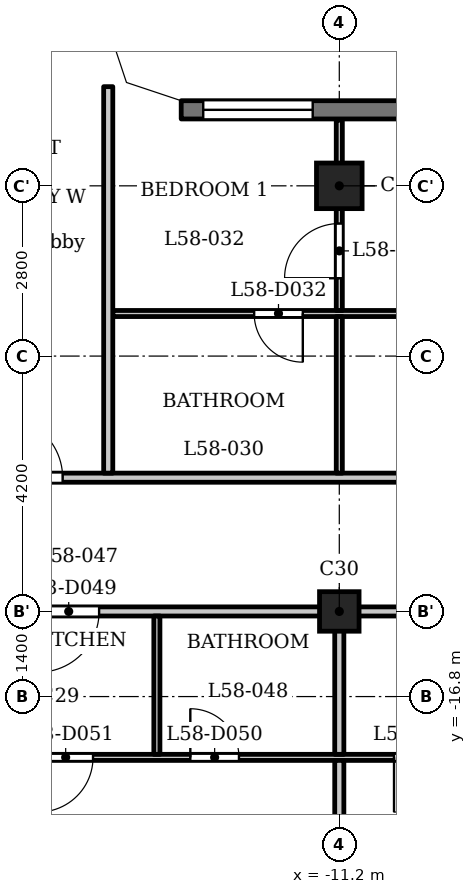
"""IFC4 building model, lengths in metres.
Left out: names, types, materials, properties, quantities, classifications, styles, units other than length and angle.
Written with IfcOpenShell. Run it as: python <this file> out.ifc"""

import sys

from ifc_helpers import new_model, si_unit, direction, frame, frame_2d, origin, origin_2d, place, context, subcontext, project, spatial, polyline, rectangle, outline, extrude, element, fill, save


model = new_model("IFC4")
c1 = context("Model", 3, precision=1e-05, world=origin(), true_north=direction((0.0, 1.0)))
c2 = subcontext(c1, "Body", "Model", "MODEL_VIEW")
j1 = project(units=[si_unit("LENGTHUNIT", "METRE"), si_unit("PLANEANGLEUNIT", "RADIAN")], contexts=[c1])
p1 = place(None, origin())
s1 = spatial("IfcSite", under=j1, at=p1, CompositionType="ELEMENT")
p2 = place(p1, origin())
s2 = spatial("IfcBuilding", under=s1, at=p2, CompositionType="ELEMENT")
p3 = place(p2, frame((0.0, 0.0, 223.9)))
s3 = spatial("IfcBuildingStorey", under=s2, at=p3, CompositionType="ELEMENT", Elevation=223.9)
p4 = place(p3, frame((-11.2, -8.4, 0.0), z_axis=(0.0, 0.0, 1.0), x_axis=(1.0, 0.0, 0.0)))
e1 = element("IfcColumn", 1, at=p4, inside=s3, PredefinedType="COLUMN", context=c2, shape_type="SweptSolid", body=[
    extrude(rectangle(XDim=0.75, YDim=0.75, at=origin_2d()), origin(), (0.0, 0.0, 1.0), 3.5),
])
p5 = place(p3, frame((-11.2, -15.4, 0.0), z_axis=(0.0, 0.0, 1.0), x_axis=(1.0, 0.0, 0.0)))
e2 = element("IfcColumn", 2, at=p5, inside=s3, PredefinedType="COLUMN", context=c2, shape_type="SweptSolid", body=[
    extrude(rectangle(XDim=0.65, YDim=0.65, at=origin_2d()), origin(), (0.0, 0.0, 1.0), 3.5),
])
p6 = place(p3, frame((13.8, -7.15, 0.0), z_axis=(0.0, 0.0, 1.0), x_axis=(-1.0, 0.0, 0.0)))
e3 = element("IfcWall", 3, at=p6, inside=s3, PredefinedType="SOLIDWALL", context=c2, shape_type="SweptSolid", body=[
    extrude(rectangle(XDim=27.6, YDim=0.3, at=frame_2d((13.8, 0.0))), origin(), (0.0, 0.0, 1.0), 3.2),
])
p7 = place(p6, frame((0.363, 0.0, 0.9)))
e4 = element("IfcOpeningElement", 4, at=p7, cuts=e3, PredefinedType="OPENING", context=c2, shape_type="SweptSolid", body=[
    extrude(rectangle(XDim=1.8, YDim=1.25, at=frame_2d((0.9, 0.625))), frame((0.0, 0.16, 0.0), z_axis=(0.0, -1.0, 0.0), x_axis=(1.0, 0.0, 0.0)), (0.0, 0.0, 1.0), 0.32),
])
p8 = place(p6, frame((3.6, 0.0, 1.2)))
e5 = element("IfcOpeningElement", 5, at=p8, cuts=e3, PredefinedType="OPENING", context=c2, shape_type="SweptSolid", body=[
    extrude(rectangle(XDim=3.6, YDim=0.95, at=frame_2d((1.8, 0.475))), frame((0.0, 0.16, 0.0), z_axis=(0.0, -1.0, 0.0), x_axis=(1.0, 0.0, 0.0)), (0.0, 0.0, 1.0), 0.32),
])
p9 = place(p6, frame((9.2, 0.0, 1.2)))
e6 = element("IfcOpeningElement", 6, at=p9, cuts=e3, PredefinedType="OPENING", context=c2, shape_type="SweptSolid", body=[
    extrude(rectangle(XDim=3.6, YDim=0.95, at=frame_2d((1.8, 0.475))), frame((0.0, 0.16, 0.0), z_axis=(0.0, -1.0, 0.0), x_axis=(1.0, 0.0, 0.0)), (0.0, 0.0, 1.0), 0.32),
])
p10 = place(p6, frame((14.8, 0.0, 1.2)))
e7 = element("IfcOpeningElement", 7, at=p10, cuts=e3, PredefinedType="OPENING", context=c2, shape_type="SweptSolid", body=[
    extrude(rectangle(XDim=3.6, YDim=0.95, at=frame_2d((1.8, 0.475))), frame((0.0, 0.16, 0.0), z_axis=(0.0, -1.0, 0.0), x_axis=(1.0, 0.0, 0.0)), (0.0, 0.0, 1.0), 0.32),
])
p11 = place(p6, frame((20.4, 0.0, 1.2)))
e8 = element("IfcOpeningElement", 8, at=p11, cuts=e3, PredefinedType="OPENING", context=c2, shape_type="SweptSolid", body=[
    extrude(rectangle(XDim=3.6, YDim=0.95, at=frame_2d((1.8, 0.475))), frame((0.0, 0.16, 0.0), z_axis=(0.0, -1.0, 0.0), x_axis=(1.0, 0.0, 0.0)), (0.0, 0.0, 1.0), 0.32),
])
p12 = place(p6, frame((25.438, 0.0, 0.9)))
e9 = element("IfcOpeningElement", 9, at=p12, cuts=e3, PredefinedType="OPENING", context=c2, shape_type="SweptSolid", body=[
    extrude(rectangle(XDim=1.8, YDim=1.25, at=frame_2d((0.9, 0.625))), frame((0.0, 0.16, 0.0), z_axis=(0.0, -1.0, 0.0), x_axis=(1.0, 0.0, 0.0)), (0.0, 0.0, 1.0), 0.32),
])
p13 = place(p3, frame((-23.594, -17.8, 0.0), z_axis=(0.0, 0.0, 1.0), x_axis=(1.0, 0.0, 0.0)))
e10 = element("IfcWall", 10, at=p13, inside=s3, PredefinedType="PARTITIONING", context=c2, shape_type="SweptSolid", body=[
    extrude(rectangle(XDim=47.188, YDim=0.1, at=frame_2d((23.594, 0.0))), origin(), (0.0, 0.0, 1.0), 3.2),
])
p14 = place(p13, frame((5.094, 0.0, 0.0)))
e11 = element("IfcOpeningElement", 11, at=p14, cuts=e10, PredefinedType="OPENING", context=c2, shape_type="SweptSolid", body=[
    extrude(rectangle(XDim=0.8, YDim=2.1, at=frame_2d((0.4, 1.05))), frame((0.0, 0.06, 0.0), z_axis=(0.0, -1.0, 0.0), x_axis=(1.0, 0.0, 0.0)), (0.0, 0.0, 1.0), 0.12),
])
p15 = place(p13, frame((1.126, 0.0, 0.0)))
e12 = element("IfcOpeningElement", 12, at=p15, cuts=e10, PredefinedType="OPENING", context=c2, shape_type="SweptSolid", body=[
    extrude(rectangle(XDim=0.9, YDim=2.1, at=frame_2d((0.45, 1.05))), frame((0.0, 0.06, 0.0), z_axis=(0.0, -1.0, 0.0), x_axis=(1.0, 0.0, 0.0)), (0.0, 0.0, 1.0), 0.12),
])
p16 = place(p13, frame((9.944, 0.0, 0.0)))
e13 = element("IfcOpeningElement", 13, at=p16, cuts=e10, PredefinedType="OPENING", context=c2, shape_type="SweptSolid", body=[
    extrude(rectangle(XDim=0.8, YDim=2.1, at=frame_2d((0.4, 1.05))), frame((0.0, 0.06, 0.0), z_axis=(0.0, -1.0, 0.0), x_axis=(1.0, 0.0, 0.0)), (0.0, 0.0, 1.0), 0.12),
])
p17 = place(p13, frame((7.444, 0.0, 0.0)))
e14 = element("IfcOpeningElement", 14, at=p17, cuts=e10, PredefinedType="OPENING", context=c2, shape_type="SweptSolid", body=[
    extrude(rectangle(XDim=0.9, YDim=2.1, at=frame_2d((0.45, 1.05))), frame((0.0, 0.06, 0.0), z_axis=(0.0, -1.0, 0.0), x_axis=(1.0, 0.0, 0.0)), (0.0, 0.0, 1.0), 0.12),
])
p18 = place(p13, frame((16.544, 0.0, 0.0)))
e15 = element("IfcOpeningElement", 15, at=p18, cuts=e10, PredefinedType="OPENING", context=c2, shape_type="SweptSolid", body=[
    extrude(rectangle(XDim=0.8, YDim=2.1, at=frame_2d((0.4, 1.05))), frame((0.0, 0.06, 0.0), z_axis=(0.0, -1.0, 0.0), x_axis=(1.0, 0.0, 0.0)), (0.0, 0.0, 1.0), 0.12),
])
p19 = place(p13, frame((13.294, 0.0, 0.0)))
e16 = element("IfcOpeningElement", 16, at=p19, cuts=e10, PredefinedType="OPENING", context=c2, shape_type="SweptSolid", body=[
    extrude(rectangle(XDim=0.9, YDim=2.1, at=frame_2d((0.45, 1.05))), frame((0.0, 0.06, 0.0), z_axis=(0.0, -1.0, 0.0), x_axis=(1.0, 0.0, 0.0)), (0.0, 0.0, 1.0), 0.12),
])
p20 = place(p13, frame((21.144, 0.0, 0.0)))
e17 = element("IfcOpeningElement", 17, at=p20, cuts=e10, PredefinedType="OPENING", context=c2, shape_type="SweptSolid", body=[
    extrude(rectangle(XDim=0.8, YDim=2.1, at=frame_2d((0.4, 1.05))), frame((0.0, 0.06, 0.0), z_axis=(0.0, -1.0, 0.0), x_axis=(1.0, 0.0, 0.0)), (0.0, 0.0, 1.0), 0.12),
])
p21 = place(p13, frame((18.894, 0.0, 0.0)))
e18 = element("IfcOpeningElement", 18, at=p21, cuts=e10, PredefinedType="OPENING", context=c2, shape_type="SweptSolid", body=[
    extrude(rectangle(XDim=0.9, YDim=2.1, at=frame_2d((0.45, 1.05))), frame((0.0, 0.06, 0.0), z_axis=(0.0, -1.0, 0.0), x_axis=(1.0, 0.0, 0.0)), (0.0, 0.0, 1.0), 0.12),
])
p22 = place(p13, frame((35.944, 0.0, 0.0)))
e19 = element("IfcOpeningElement", 19, at=p22, cuts=e10, PredefinedType="OPENING", context=c2, shape_type="SweptSolid", body=[
    extrude(rectangle(XDim=0.9, YDim=2.1, at=frame_2d((0.45, 1.05))), frame((0.0, 0.06, 0.0), z_axis=(0.0, -1.0, 0.0), x_axis=(1.0, 0.0, 0.0)), (0.0, 0.0, 1.0), 0.12),
])
p23 = place(p13, frame((32.594, 0.0, 0.0)))
e20 = element("IfcOpeningElement", 20, at=p23, cuts=e10, PredefinedType="OPENING", context=c2, shape_type="SweptSolid", body=[
    extrude(rectangle(XDim=0.9, YDim=2.1, at=frame_2d((0.45, 1.05))), frame((0.0, 0.06, 0.0), z_axis=(0.0, -1.0, 0.0), x_axis=(1.0, 0.0, 0.0)), (0.0, 0.0, 1.0), 0.12),
])
p24 = place(p13, frame((40.944, 0.0, 0.0)))
e21 = element("IfcOpeningElement", 21, at=p24, cuts=e10, PredefinedType="OPENING", context=c2, shape_type="SweptSolid", body=[
    extrude(rectangle(XDim=0.8, YDim=2.1, at=frame_2d((0.4, 1.05))), frame((0.0, 0.06, 0.0), z_axis=(0.0, -1.0, 0.0), x_axis=(1.0, 0.0, 0.0)), (0.0, 0.0, 1.0), 0.12),
])
p25 = place(p13, frame((45.444, 0.0, 0.0)))
e22 = element("IfcOpeningElement", 22, at=p25, cuts=e10, PredefinedType="OPENING", context=c2, shape_type="SweptSolid", body=[
    extrude(rectangle(XDim=0.9, YDim=2.1, at=frame_2d((0.45, 1.05))), frame((0.0, 0.06, 0.0), z_axis=(0.0, -1.0, 0.0), x_axis=(1.0, 0.0, 0.0)), (0.0, 0.0, 1.0), 0.12),
])
p26 = place(p3, frame((-24.684, -15.4, 0.0), z_axis=(0.0, 0.0, 1.0), x_axis=(1.0, 0.0, 0.0)))
e23 = element("IfcWall", 23, at=p26, inside=s3, PredefinedType="PARTITIONING", context=c2, shape_type="SweptSolid", body=[
    extrude(rectangle(XDim=49.368, YDim=0.15, at=frame_2d((24.684, 0.0))), origin(), (0.0, 0.0, 1.0), 3.2),
])
p27 = place(p26, frame((1.143, 0.0, 0.0)))
e24 = element("IfcOpeningElement", 24, at=p27, cuts=e23, PredefinedType="OPENING", context=c2, shape_type="SweptSolid", body=[
    extrude(rectangle(XDim=1.0, YDim=2.1, at=frame_2d((0.5, 1.05))), frame((0.0, 0.085, 0.0), z_axis=(0.0, -1.0, 0.0), x_axis=(1.0, 0.0, 0.0)), (0.0, 0.0, 1.0), 0.17),
])
p28 = place(p26, frame((8.534, 0.0, 0.0)))
e25 = element("IfcOpeningElement", 25, at=p28, cuts=e23, PredefinedType="OPENING", context=c2, shape_type="SweptSolid", body=[
    extrude(rectangle(XDim=1.0, YDim=2.1, at=frame_2d((0.5, 1.05))), frame((0.0, 0.085, 0.0), z_axis=(0.0, -1.0, 0.0), x_axis=(1.0, 0.0, 0.0)), (0.0, 0.0, 1.0), 0.17),
])
p29 = place(p26, frame((15.384, 0.0, 0.0)))
e26 = element("IfcOpeningElement", 26, at=p29, cuts=e23, PredefinedType="OPENING", context=c2, shape_type="SweptSolid", body=[
    extrude(rectangle(XDim=1.0, YDim=2.1, at=frame_2d((0.5, 1.05))), frame((0.0, 0.085, 0.0), z_axis=(0.0, -1.0, 0.0), x_axis=(1.0, 0.0, 0.0)), (0.0, 0.0, 1.0), 0.17),
])
p30 = place(p26, frame((19.984, 0.0, 0.0)))
e27 = element("IfcOpeningElement", 27, at=p30, cuts=e23, PredefinedType="OPENING", context=c2, shape_type="SweptSolid", body=[
    extrude(rectangle(XDim=1.0, YDim=2.1, at=frame_2d((0.5, 1.05))), frame((0.0, 0.085, 0.0), z_axis=(0.0, -1.0, 0.0), x_axis=(1.0, 0.0, 0.0)), (0.0, 0.0, 1.0), 0.17),
])
p31 = place(p26, frame((39.784, 0.0, 0.0)))
e28 = element("IfcOpeningElement", 28, at=p31, cuts=e23, PredefinedType="OPENING", context=c2, shape_type="SweptSolid", body=[
    extrude(rectangle(XDim=1.0, YDim=2.1, at=frame_2d((0.5, 1.05))), frame((0.0, 0.085, 0.0), z_axis=(0.0, -1.0, 0.0), x_axis=(1.0, 0.0, 0.0)), (0.0, 0.0, 1.0), 0.17),
])
p32 = place(p26, frame((47.384, 0.0, 0.0)))
e29 = element("IfcOpeningElement", 29, at=p32, cuts=e23, PredefinedType="OPENING", context=c2, shape_type="SweptSolid", body=[
    extrude(rectangle(XDim=1.0, YDim=2.1, at=frame_2d((0.5, 1.05))), frame((0.0, 0.085, 0.0), z_axis=(0.0, -1.0, 0.0), x_axis=(1.0, 0.0, 0.0)), (0.0, 0.0, 1.0), 0.17),
])
p33 = place(p3, frame((-17.4, -13.2, 0.0), z_axis=(0.0, 0.0, 1.0), x_axis=(1.0, 0.0, 0.0)))
e30 = element("IfcWall", 30, at=p33, inside=s3, PredefinedType="PARTITIONING", context=c2, shape_type="SweptSolid", body=[
    extrude(rectangle(XDim=34.8, YDim=0.15, at=frame_2d((17.4, 0.0))), origin(), (0.0, 0.0, 1.0), 3.2),
])
p34 = place(p33, frame((0.65, 0.0, 0.0)))
e31 = element("IfcOpeningElement", 31, at=p34, cuts=e30, PredefinedType="OPENING", context=c2, shape_type="SweptSolid", body=[
    extrude(rectangle(XDim=1.0, YDim=2.1, at=frame_2d((0.5, 1.05))), frame((0.0, 0.085, 0.0), z_axis=(0.0, -1.0, 0.0), x_axis=(1.0, 0.0, 0.0)), (0.0, 0.0, 1.0), 0.17),
])
p35 = place(p33, frame((33.05, 0.0, 0.0)))
e32 = element("IfcOpeningElement", 32, at=p35, cuts=e30, PredefinedType="OPENING", context=c2, shape_type="SweptSolid", body=[
    extrude(rectangle(XDim=1.0, YDim=2.1, at=frame_2d((0.5, 1.05))), frame((0.0, 0.085, 0.0), z_axis=(0.0, -1.0, 0.0), x_axis=(1.0, 0.0, 0.0)), (0.0, 0.0, 1.0), 0.17),
])
p36 = place(p33, frame((10.15, 0.0, 0.0)))
e33 = element("IfcOpeningElement", 33, at=p36, cuts=e30, PredefinedType="OPENING", context=c2, shape_type="SweptSolid", body=[
    extrude(rectangle(XDim=1.0, YDim=2.1, at=frame_2d((0.5, 1.05))), frame((0.0, 0.085, 0.0), z_axis=(0.0, -1.0, 0.0), x_axis=(1.0, 0.0, 0.0)), (0.0, 0.0, 1.0), 0.17),
])
p37 = place(p33, frame((12.5, 0.0, 0.0)))
e34 = element("IfcOpeningElement", 34, at=p37, cuts=e30, PredefinedType="OPENING", context=c2, shape_type="SweptSolid", body=[
    extrude(rectangle(XDim=1.0, YDim=2.1, at=frame_2d((0.5, 1.05))), frame((0.0, 0.085, 0.0), z_axis=(0.0, -1.0, 0.0), x_axis=(1.0, 0.0, 0.0)), (0.0, 0.0, 1.0), 0.17),
])
p38 = place(p33, frame((18.0, 0.0, 0.0)))
e35 = element("IfcOpeningElement", 35, at=p38, cuts=e30, PredefinedType="OPENING", context=c2, shape_type="SweptSolid", body=[
    extrude(rectangle(XDim=1.0, YDim=2.1, at=frame_2d((0.5, 1.05))), frame((0.0, 0.085, 0.0), z_axis=(0.0, -1.0, 0.0), x_axis=(1.0, 0.0, 0.0)), (0.0, 0.0, 1.0), 0.17),
])
p39 = place(p33, frame((30.75, 0.0, 0.0)))
e36 = element("IfcOpeningElement", 36, at=p39, cuts=e30, PredefinedType="OPENING", context=c2, shape_type="SweptSolid", body=[
    extrude(rectangle(XDim=1.0, YDim=2.1, at=frame_2d((0.5, 1.05))), frame((0.0, 0.085, 0.0), z_axis=(0.0, -1.0, 0.0), x_axis=(1.0, 0.0, 0.0)), (0.0, 0.0, 1.0), 0.17),
])
p40 = place(p3, frame((-14.925, -10.5, 0.0), z_axis=(0.0, 0.0, 1.0), x_axis=(1.0, 0.0, 0.0)))
e37 = element("IfcWall", 37, at=p40, inside=s3, PredefinedType="PARTITIONING", context=c2, shape_type="SweptSolid", body=[
    extrude(rectangle(XDim=29.85, YDim=0.1, at=frame_2d((14.925, 0.0))), origin(), (0.0, 0.0, 1.0), 3.2),
])
p41 = place(p40, frame((2.325, 0.0, 0.0)))
e38 = element("IfcOpeningElement", 38, at=p41, cuts=e37, PredefinedType="OPENING", context=c2, shape_type="SweptSolid", body=[
    extrude(rectangle(XDim=0.8, YDim=2.1, at=frame_2d((0.4, 1.05))), frame((0.0, 0.06, 0.0), z_axis=(0.0, -1.0, 0.0), x_axis=(1.0, 0.0, 0.0)), (0.0, 0.0, 1.0), 0.12),
])
p42 = place(p40, frame((7.775, 0.0, 0.0)))
e39 = element("IfcOpeningElement", 39, at=p42, cuts=e37, PredefinedType="OPENING", context=c2, shape_type="SweptSolid", body=[
    extrude(rectangle(XDim=0.9, YDim=2.1, at=frame_2d((0.45, 1.05))), frame((0.0, 0.06, 0.0), z_axis=(0.0, -1.0, 0.0), x_axis=(1.0, 0.0, 0.0)), (0.0, 0.0, 1.0), 0.12),
])
p43 = place(p40, frame((13.575, 0.0, 0.0)))
e40 = element("IfcOpeningElement", 40, at=p43, cuts=e37, PredefinedType="OPENING", context=c2, shape_type="SweptSolid", body=[
    extrude(rectangle(XDim=0.8, YDim=2.1, at=frame_2d((0.4, 1.05))), frame((0.0, 0.06, 0.0), z_axis=(0.0, -1.0, 0.0), x_axis=(1.0, 0.0, 0.0)), (0.0, 0.0, 1.0), 0.12),
])
p44 = place(p40, frame((10.125, 0.0, 0.0)))
e41 = element("IfcOpeningElement", 41, at=p44, cuts=e37, PredefinedType="OPENING", context=c2, shape_type="SweptSolid", body=[
    extrude(rectangle(XDim=0.9, YDim=2.1, at=frame_2d((0.45, 1.05))), frame((0.0, 0.06, 0.0), z_axis=(0.0, -1.0, 0.0), x_axis=(1.0, 0.0, 0.0)), (0.0, 0.0, 1.0), 0.12),
])
p45 = place(p40, frame((18.825, 0.0, 0.0)))
e42 = element("IfcOpeningElement", 42, at=p45, cuts=e37, PredefinedType="OPENING", context=c2, shape_type="SweptSolid", body=[
    extrude(rectangle(XDim=0.8, YDim=2.1, at=frame_2d((0.4, 1.05))), frame((0.0, 0.06, 0.0), z_axis=(0.0, -1.0, 0.0), x_axis=(1.0, 0.0, 0.0)), (0.0, 0.0, 1.0), 0.12),
])
p46 = place(p40, frame((15.625, 0.0, 0.0)))
e43 = element("IfcOpeningElement", 43, at=p46, cuts=e37, PredefinedType="OPENING", context=c2, shape_type="SweptSolid", body=[
    extrude(rectangle(XDim=0.9, YDim=2.1, at=frame_2d((0.45, 1.05))), frame((0.0, 0.06, 0.0), z_axis=(0.0, -1.0, 0.0), x_axis=(1.0, 0.0, 0.0)), (0.0, 0.0, 1.0), 0.12),
])
p47 = place(p40, frame((24.675, 0.0, 0.0)))
e44 = element("IfcOpeningElement", 44, at=p47, cuts=e37, PredefinedType="OPENING", context=c2, shape_type="SweptSolid", body=[
    extrude(rectangle(XDim=0.8, YDim=2.1, at=frame_2d((0.4, 1.05))), frame((0.0, 0.06, 0.0), z_axis=(0.0, -1.0, 0.0), x_axis=(1.0, 0.0, 0.0)), (0.0, 0.0, 1.0), 0.12),
])
p48 = place(p40, frame((28.375, 0.0, 0.0)))
e45 = element("IfcOpeningElement", 45, at=p48, cuts=e37, PredefinedType="OPENING", context=c2, shape_type="SweptSolid", body=[
    extrude(rectangle(XDim=0.9, YDim=2.1, at=frame_2d((0.45, 1.05))), frame((0.0, 0.06, 0.0), z_axis=(0.0, -1.0, 0.0), x_axis=(1.0, 0.0, 0.0)), (0.0, 0.0, 1.0), 0.12),
])
p49 = place(p3, frame((-15.0, -13.125, 0.0), z_axis=(0.0, 0.0, 1.0), x_axis=(0.0, 1.0, 0.0)))
e46 = element("IfcWall", 46, at=p49, inside=s3, PredefinedType="PARTITIONING", context=c2, shape_type="SweptSolid", body=[
    extrude(rectangle(XDim=6.356, YDim=0.15, at=frame_2d((3.178, 0.0))), origin(), (0.0, 0.0, 1.0), 3.2),
])
p50 = place(p3, frame((-14.2, -17.75, 0.0), z_axis=(0.0, 0.0, 1.0), x_axis=(0.0, 1.0, 0.0)))
e47 = element("IfcWall", 47, at=p50, inside=s3, PredefinedType="PARTITIONING", context=c2, shape_type="SweptSolid", body=[
    extrude(rectangle(XDim=2.275, YDim=0.1, at=frame_2d((1.137, 0.0))), origin(), (0.0, 0.0, 1.0), 3.2),
])
p51 = place(p3, frame((-11.2, -13.125, 0.0), z_axis=(0.0, 0.0, 1.0), x_axis=(0.0, 1.0, 0.0)))
e48 = element("IfcWall", 48, at=p51, inside=s3, PredefinedType="PARTITIONING", context=c2, shape_type="SweptSolid", body=[
    extrude(rectangle(XDim=2.575, YDim=0.1, at=frame_2d((1.288, 0.0))), origin(), (0.0, 0.0, 1.0), 3.2),
])
p52 = place(p3, frame((-11.2, -10.45, 0.0), z_axis=(0.0, 0.0, 1.0), x_axis=(0.0, 1.0, 0.0)))
e49 = element("IfcWall", 49, at=p52, inside=s3, PredefinedType="PARTITIONING", context=c2, shape_type="SweptSolid", body=[
    extrude(rectangle(XDim=3.13, YDim=0.1, at=frame_2d((1.565, 0.0))), origin(), (0.0, 0.0, 1.0), 3.2),
])
p53 = place(p52, frame((0.53, 0.0, 0.0)))
e50 = element("IfcOpeningElement", 50, at=p53, cuts=e49, PredefinedType="OPENING", context=c2, shape_type="SweptSolid", body=[
    extrude(rectangle(XDim=0.9, YDim=2.1, at=frame_2d((0.45, 1.05))), frame((0.0, 0.06, 0.0), z_axis=(0.0, -1.0, 0.0), x_axis=(1.0, 0.0, 0.0)), (0.0, 0.0, 1.0), 0.12),
])
p54 = place(p3, frame((-11.2, -22.08, 0.0), z_axis=(0.0, 0.0, 1.0), x_axis=(0.0, 1.0, 0.0)))
e51 = element("IfcWall", 51, at=p54, inside=s3, PredefinedType="PARTITIONING", context=c2, shape_type="SweptSolid", body=[
    extrude(rectangle(XDim=4.23, YDim=0.15, at=frame_2d((2.115, 0.0))), origin(), (0.0, 0.0, 1.0), 3.2),
])
p55 = place(p3, frame((-11.2, -17.75, 0.0), z_axis=(0.0, 0.0, 1.0), x_axis=(0.0, 1.0, 0.0)))
e52 = element("IfcWall", 52, at=p55, inside=s3, PredefinedType="PARTITIONING", context=c2, shape_type="SweptSolid", body=[
    extrude(rectangle(XDim=2.275, YDim=0.15, at=frame_2d((1.137, 0.0))), origin(), (0.0, 0.0, 1.0), 3.2),
])
p56 = place(p3, origin())
e53 = element("IfcWall", 53, at=p56, inside=s3, PredefinedType="SOLIDWALL", context=c2, shape_type="SweptSolid", body=[
    extrude(outline(polyline([(-14.937, -6.937), (-13.849, -7.3), (-13.8, -7.3), (-13.8, -7.0), (-14.7, -6.7), (-15.0, -5.8), (-15.3, -5.8), (-15.3, -5.849), (-14.937, -6.937)])), origin(), (0.0, 0.0, 1.0), 3.2),
])
p57 = place(p34, origin())
e54 = element("IfcDoor", 54, at=p57, inside=s3, OperationType="SINGLE_SWING_RIGHT", PredefinedType="DOOR", context=c2, shape_type="SweptSolid", body=[
    extrude(rectangle(XDim=1.0, YDim=2.1, at=frame_2d((0.5, 1.05))), frame((0.0, 0.025, 0.0), z_axis=(0.0, -1.0, 0.0), x_axis=(1.0, 0.0, 0.0)), (0.0, 0.0, 1.0), 0.05),
])
fill(e31, e54)
p58 = place(p41, origin())
e55 = element("IfcDoor", 55, at=p58, inside=s3, OperationType="SINGLE_SWING_RIGHT", PredefinedType="DOOR", context=c2, shape_type="SweptSolid", body=[
    extrude(rectangle(XDim=0.8, YDim=2.1, at=frame_2d((0.4, 1.05))), frame((0.0, 0.025, 0.0), z_axis=(0.0, -1.0, 0.0), x_axis=(1.0, 0.0, 0.0)), (0.0, 0.0, 1.0), 0.05),
])
fill(e38, e55)
p59 = place(p53, origin())
e56 = element("IfcDoor", 56, at=p59, inside=s3, OperationType="SINGLE_SWING_RIGHT", PredefinedType="DOOR", context=c2, shape_type="SweptSolid", body=[
    extrude(rectangle(XDim=0.9, YDim=2.1, at=frame_2d((0.45, 1.05))), frame((0.0, 0.025, 0.0), z_axis=(0.0, -1.0, 0.0), x_axis=(1.0, 0.0, 0.0)), (0.0, 0.0, 1.0), 0.05),
])
fill(e50, e56)
p60 = place(p28, origin())
e57 = element("IfcDoor", 57, at=p60, inside=s3, OperationType="SINGLE_SWING_LEFT", PredefinedType="DOOR", context=c2, shape_type="SweptSolid", body=[
    extrude(rectangle(XDim=1.0, YDim=2.1, at=frame_2d((0.5, 1.05))), frame((0.0, 0.025, 0.0), z_axis=(0.0, -1.0, 0.0), x_axis=(1.0, 0.0, 0.0)), (0.0, 0.0, 1.0), 0.05),
])
fill(e25, e57)
p61 = place(p16, origin())
e58 = element("IfcDoor", 58, at=p61, inside=s3, OperationType="SINGLE_SWING_RIGHT", PredefinedType="DOOR", context=c2, shape_type="SweptSolid", body=[
    extrude(rectangle(XDim=0.8, YDim=2.1, at=frame_2d((0.4, 1.05))), frame((0.0, 0.025, 0.0), z_axis=(0.0, -1.0, 0.0), x_axis=(1.0, 0.0, 0.0)), (0.0, 0.0, 1.0), 0.05),
])
fill(e13, e58)
p62 = place(p17, origin())
e59 = element("IfcDoor", 59, at=p62, inside=s3, OperationType="SINGLE_SWING_LEFT", PredefinedType="DOOR", context=c2, shape_type="SweptSolid", body=[
    extrude(rectangle(XDim=0.9, YDim=2.1, at=frame_2d((0.45, 1.05))), frame((0.0, 0.025, 0.0), z_axis=(0.0, -1.0, 0.0), x_axis=(1.0, 0.0, 0.0)), (0.0, 0.0, 1.0), 0.05),
])
fill(e14, e59)
p63 = place(p19, origin())
e60 = element("IfcDoor", 60, at=p63, inside=s3, OperationType="SINGLE_SWING_LEFT", PredefinedType="DOOR", context=c2, shape_type="SweptSolid", body=[
    extrude(rectangle(XDim=0.9, YDim=2.1, at=frame_2d((0.45, 1.05))), frame((0.0, 0.025, 0.0), z_axis=(0.0, -1.0, 0.0), x_axis=(1.0, 0.0, 0.0)), (0.0, 0.0, 1.0), 0.05),
])
fill(e16, e60)
p64 = place(p12, origin())
e61 = element("IfcWindow", 61, at=p64, inside=s3, PartitioningType="SINGLE_PANEL", PredefinedType="WINDOW", context=c2, shape_type="SweptSolid", body=[
    extrude(rectangle(XDim=1.8, YDim=1.25, at=frame_2d((0.9, 0.625))), frame((0.0, 0.03, 0.0), z_axis=(0.0, -1.0, 0.0), x_axis=(1.0, 0.0, 0.0)), (0.0, 0.0, 1.0), 0.06),
])
fill(e9, e61)
save(model, sys.argv[1])
